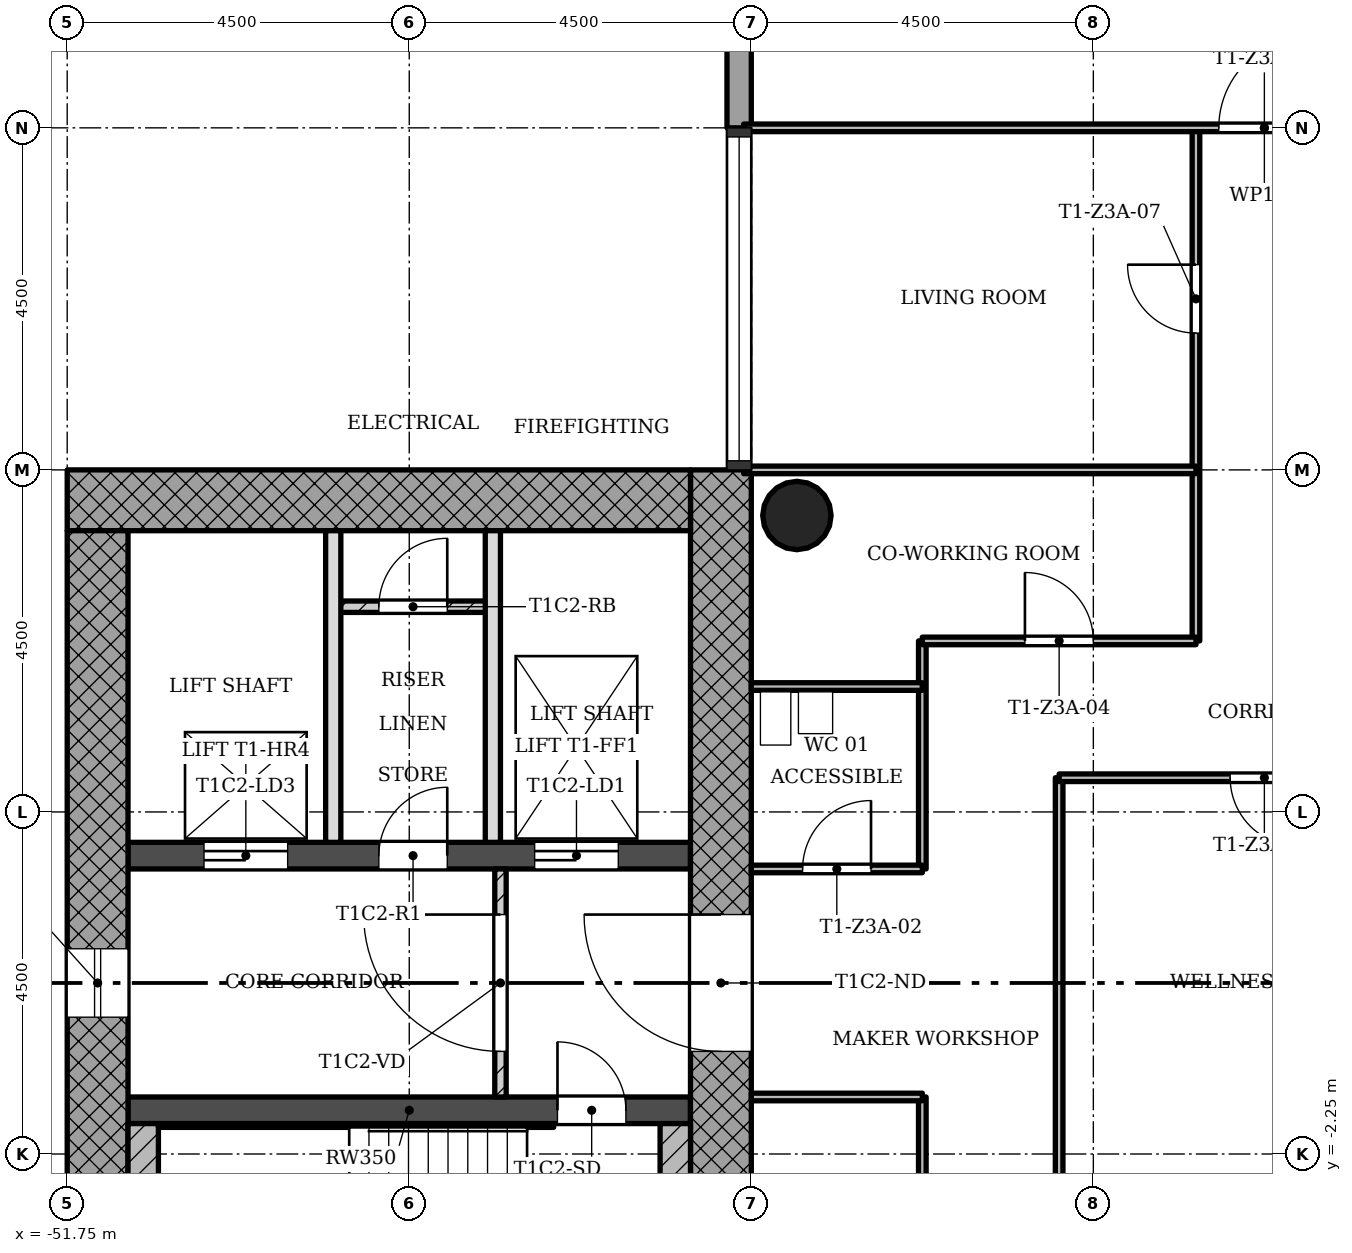
"""IFC4 building model, lengths in metres.
Left out: names, types, materials, properties, quantities, classifications, styles, units other than length and angle.
Written with IfcOpenShell. Run it as: python <this file> out.ifc"""

import sys

from ifc_helpers import new_model, si_unit, direction, frame, frame_2d, origin, origin_2d, place, context, subcontext, project, spatial, rectangle, hollow_circle, extrude, element, fill, save


model = new_model("IFC4")
c1 = context("Model", 3, precision=1e-05, world=origin(), true_north=direction((0.0, 1.0)))
c2 = subcontext(c1, "Body", "Model", "MODEL_VIEW")
j1 = project(units=[si_unit("LENGTHUNIT", "METRE"), si_unit("PLANEANGLEUNIT", "RADIAN")], contexts=[c1])
p1 = place(None, origin())
s1 = spatial("IfcSite", under=j1, at=p1, CompositionType="ELEMENT")
p2 = place(p1, origin())
s2 = spatial("IfcBuilding", under=s1, at=p2, CompositionType="ELEMENT")
p3 = place(p2, frame((0.0, 0.0, 140.5)))
s3 = spatial("IfcBuildingStorey", under=s2, at=p3, CompositionType="ELEMENT", Elevation=140.5)
p4 = place(p3, frame((-43.15, -5.95, 0.0), z_axis=(0.0, 0.0, 1.0), x_axis=(0.0, 1.0, 0.0)))
e1 = element("IfcWall", 1, at=p4, inside=s3, PredefinedType="SHEAR", context=c2, shape_type="SweptSolid", body=[
    extrude(rectangle(XDim=12.7, YDim=0.8, at=frame_2d((6.35, 0.0))), origin(), (0.0, 0.0, 1.0), 3.4),
])
p5 = place(p4, frame((5.05, 0.0, 0.0)))
e2 = element("IfcOpeningElement", 2, at=p5, cuts=e1, PredefinedType="OPENING", context=c2, shape_type="SweptSolid", body=[
    extrude(rectangle(XDim=1.8, YDim=2.1, at=frame_2d((0.9, 1.05))), frame((0.0, 0.41, 0.0), z_axis=(0.0, -1.0, 0.0), x_axis=(1.0, 0.0, 0.0)), (0.0, 0.0, 1.0), 0.82),
])
p6 = place(p3, frame((-43.55, 6.35, 0.0), z_axis=(0.0, 0.0, 1.0), x_axis=(-1.0, 0.0, 0.0)))
e3 = element("IfcWall", 3, at=p6, inside=s3, PredefinedType="SHEAR", context=c2, shape_type="SweptSolid", body=[
    extrude(rectangle(XDim=8.2, YDim=0.8, at=frame_2d((4.1, 0.0))), origin(), (0.0, 0.0, 1.0), 3.4),
])
p7 = place(p3, frame((-51.35, 5.95, 0.0), z_axis=(0.0, 0.0, 1.0), x_axis=(0.0, -1.0, 0.0)))
e4 = element("IfcWall", 4, at=p7, inside=s3, PredefinedType="SHEAR", context=c2, shape_type="SweptSolid", body=[
    extrude(rectangle(XDim=12.7, YDim=0.8, at=frame_2d((6.35, 0.0))), origin(), (0.0, 0.0, 1.0), 3.4),
])
p8 = place(p7, frame((5.5, 0.0, 0.45)))
e5 = element("IfcOpeningElement", 5, at=p8, cuts=e4, PredefinedType="OPENING", context=c2, shape_type="SweptSolid", body=[
    extrude(rectangle(XDim=0.9, YDim=2.4, at=frame_2d((0.45, 1.2))), frame((0.0, 0.41, 0.0), z_axis=(0.0, -1.0, 0.0), x_axis=(1.0, 0.0, 0.0)), (0.0, 0.0, 1.0), 0.82),
])
p9 = place(p3, frame((-50.95, -1.675, 0.0), z_axis=(0.0, 0.0, 1.0), x_axis=(1.0, 0.0, 0.0)))
e6 = element("IfcWall", 6, at=p9, inside=s3, PredefinedType="SHEAR", context=c2, shape_type="SweptSolid", body=[
    extrude(rectangle(XDim=7.4, YDim=0.35, at=frame_2d((3.7, 0.0))), origin(), (0.0, 0.0, 1.0), 3.4),
])
p10 = place(p9, frame((5.65, 0.0, 0.0)))
e7 = element("IfcOpeningElement", 7, at=p10, cuts=e6, PredefinedType="OPENING", context=c2, shape_type="SweptSolid", body=[
    extrude(rectangle(XDim=0.9, YDim=2.1, at=frame_2d((0.45, 1.05))), frame((0.0, 0.185, 0.0), z_axis=(0.0, -1.0, 0.0), x_axis=(1.0, 0.0, 0.0)), (0.0, 0.0, 1.0), 0.37),
])
p11 = place(p3, frame((-50.95, 1.675, 0.0), z_axis=(0.0, 0.0, 1.0), x_axis=(1.0, 0.0, 0.0)))
e8 = element("IfcWall", 8, at=p11, inside=s3, PredefinedType="SHEAR", context=c2, shape_type="SweptSolid", body=[
    extrude(rectangle(XDim=7.4, YDim=0.35, at=frame_2d((3.7, 0.0))), origin(), (0.0, 0.0, 1.0), 3.4),
])
p12 = place(p11, frame((5.35, 0.0, 0.0)))
e9 = element("IfcOpeningElement", 9, at=p12, cuts=e8, PredefinedType="OPENING", context=c2, shape_type="SweptSolid", body=[
    extrude(rectangle(XDim=1.1, YDim=2.1, at=frame_2d((0.55, 1.05))), frame((0.0, 0.185, 0.0), z_axis=(0.0, -1.0, 0.0), x_axis=(1.0, 0.0, 0.0)), (0.0, 0.0, 1.0), 0.37),
])
p13 = place(p11, frame((1.0, 0.0, 0.0)))
e10 = element("IfcOpeningElement", 10, at=p13, cuts=e8, PredefinedType="OPENING", context=c2, shape_type="SweptSolid", body=[
    extrude(rectangle(XDim=1.1, YDim=2.1, at=frame_2d((0.55, 1.05))), frame((0.0, 0.185, 0.0), z_axis=(0.0, -1.0, 0.0), x_axis=(1.0, 0.0, 0.0)), (0.0, 0.0, 1.0), 0.37),
])
p14 = place(p11, frame((3.3, 0.0, 0.0)))
e11 = element("IfcOpeningElement", 11, at=p14, cuts=e8, PredefinedType="OPENING", context=c2, shape_type="SweptSolid", body=[
    extrude(rectangle(XDim=0.9, YDim=2.1, at=frame_2d((0.45, 1.05))), frame((0.0, 0.185, 0.0), z_axis=(0.0, -1.0, 0.0), x_axis=(1.0, 0.0, 0.0)), (0.0, 0.0, 1.0), 0.37),
])
p15 = place(p3, frame((-42.15, 6.15, 0.0), z_axis=(0.0, 0.0, 1.0), x_axis=(1.0, 0.0, 0.0)))
e12 = element("IfcColumn", 12, at=p15, inside=s3, PredefinedType="COLUMN", context=c2, shape_type="SweptSolid", body=[
    extrude(hollow_circle(Radius=0.45, WallThickness=0.032, at=origin_2d()), origin(), (0.0, 0.0, 1.0), 3.4),
])
p16 = place(p3, frame((-42.91, 12.75, -0.3), z_axis=(0.0, 0.0, 1.0), x_axis=(0.0, -1.0, 0.0)))
e13 = element("IfcWall", 13, at=p16, inside=s3, PredefinedType="STANDARD", context=c2, shape_type="SweptSolid", body=[
    extrude(rectangle(XDim=1.5, YDim=0.32, at=frame_2d((0.75, 0.0))), origin(), (0.0, 0.0, 1.0), 3.4),
])
p17 = place(p3, frame((-46.05, 1.5, 0.0), z_axis=(0.0, 0.0, 1.0), x_axis=(0.0, -1.0, 0.0)))
e14 = element("IfcWall", 14, at=p17, inside=s3, PredefinedType="PARTITIONING", context=c2, shape_type="SweptSolid", body=[
    extrude(rectangle(XDim=3.0, YDim=0.15, at=frame_2d((1.5, 0.0))), origin(), (0.0, 0.0, 1.0), 3.0),
])
p18 = place(p17, frame((0.6, 0.0, 0.0)))
e15 = element("IfcOpeningElement", 15, at=p18, cuts=e14, PredefinedType="OPENING", context=c2, shape_type="SweptSolid", body=[
    extrude(rectangle(XDim=1.8, YDim=2.1, at=frame_2d((0.9, 1.05))), frame((0.0, 0.085, 0.0), z_axis=(0.0, -1.0, 0.0), x_axis=(1.0, 0.0, 0.0)), (0.0, 0.0, 1.0), 0.17),
])
for number, where, z_axis, x_axis in (
    (16, (-48.25, 5.95, 0.0), (0.0, 0.0, 1.0), (0.0, -1.0, 0.0)),
    (17, (-46.15, 5.95, 0.0), (0.0, 0.0, 1.0), (0.0, -1.0, 0.0)),
):
    element("IfcWall", number, at=place(p3, frame(where, z_axis=z_axis, x_axis=x_axis)), inside=s3, PredefinedType="SOLIDWALL", context=c2, shape_type="SweptSolid", body=[
        extrude(rectangle(XDim=4.1, YDim=0.2, at=frame_2d((2.05, 0.0))), origin(), (0.0, 0.0, 1.0), 3.0),
    ])
p19 = place(p3, frame((-46.15, 4.95, 0.0), z_axis=(0.0, 0.0, 1.0), x_axis=(-1.0, 0.0, 0.0)))
e18 = element("IfcWall", 18, at=p19, inside=s3, PredefinedType="PARTITIONING", context=c2, shape_type="SweptSolid", body=[
    extrude(rectangle(XDim=2.1, YDim=0.15, at=frame_2d((1.05, 0.0))), origin(), (0.0, 0.0, 1.0), 3.0),
])
p20 = place(p19, frame((0.6, 0.0, 0.0)))
e19 = element("IfcOpeningElement", 19, at=p20, cuts=e18, PredefinedType="OPENING", context=c2, shape_type="SweptSolid", body=[
    extrude(rectangle(XDim=0.9, YDim=2.1, at=frame_2d((0.45, 1.05))), frame((0.0, 0.085, 0.0), z_axis=(0.0, -1.0, 0.0), x_axis=(1.0, 0.0, 0.0)), (0.0, 0.0, 1.0), 0.17),
])
for number, where, z_axis, x_axis in (
    (20, (-40.5, -4.5, 0.0), (0.0, 0.0, 1.0), (0.0, 1.0, 0.0)),
    (21, (-40.5, 1.5, 0.0), (0.0, 0.0, 1.0), (0.0, 1.0, 0.0)),
):
    element("IfcWall", number, at=place(p3, frame(where, z_axis=z_axis, x_axis=x_axis)), inside=s3, PredefinedType="PARTITIONING", context=c2, shape_type="SweptSolid", body=[
        extrude(rectangle(XDim=3.0, YDim=0.1, at=frame_2d((1.5, 0.0))), origin(), (0.0, 0.0, 1.0), 3.0),
    ])
p21 = place(p3, frame((-38.7, -2.7, 0.0), z_axis=(0.0, 0.0, 1.0), x_axis=(0.0, 1.0, 0.0)))
e22 = element("IfcWall", 22, at=p21, inside=s3, PredefinedType="PARTITIONING", context=c2, shape_type="SweptSolid", body=[
    extrude(rectangle(XDim=5.4, YDim=0.1, at=frame_2d((2.7, 0.0))), origin(), (0.0, 0.0, 1.0), 3.0),
])
p22 = place(p3, frame((-36.9, 4.5, 0.0), z_axis=(0.0, 0.0, 1.0), x_axis=(0.0, 1.0, 0.0)))
e23 = element("IfcWall", 23, at=p22, inside=s3, PredefinedType="PARTITIONING", context=c2, shape_type="SweptSolid", body=[
    extrude(rectangle(XDim=6.75, YDim=0.1, at=frame_2d((3.375, 0.0))), origin(), (0.0, 0.0, 1.0), 3.0),
])
p23 = place(p22, frame((4.05, 0.0, 0.0)))
e24 = element("IfcOpeningElement", 24, at=p23, cuts=e23, PredefinedType="OPENING", context=c2, shape_type="SweptSolid", body=[
    extrude(rectangle(XDim=0.9, YDim=2.1, at=frame_2d((0.45, 1.05))), frame((0.0, 0.06, 0.0), z_axis=(0.0, -1.0, 0.0), x_axis=(1.0, 0.0, 0.0)), (0.0, 0.0, 1.0), 0.12),
])
p24 = place(p3, frame((-42.75, -1.5, 0.0), z_axis=(0.0, 0.0, 1.0), x_axis=(1.0, 0.0, 0.0)))
e25 = element("IfcWall", 25, at=p24, inside=s3, PredefinedType="PARTITIONING", context=c2, shape_type="SweptSolid", body=[
    extrude(rectangle(XDim=2.25, YDim=0.1, at=frame_2d((1.125, 0.0))), origin(), (0.0, 0.0, 1.0), 3.0),
])
p25 = place(p3, frame((-42.75, 1.5, 0.0), z_axis=(0.0, 0.0, 1.0), x_axis=(1.0, 0.0, 0.0)))
e26 = element("IfcWall", 26, at=p25, inside=s3, PredefinedType="PARTITIONING", context=c2, shape_type="SweptSolid", body=[
    extrude(rectangle(XDim=2.25, YDim=0.1, at=frame_2d((1.125, 0.0))), origin(), (0.0, 0.0, 1.0), 3.0),
])
p26 = place(p25, frame((0.675, 0.0, 0.0)))
e27 = element("IfcOpeningElement", 27, at=p26, cuts=e26, PredefinedType="OPENING", context=c2, shape_type="SweptSolid", body=[
    extrude(rectangle(XDim=0.9, YDim=2.1, at=frame_2d((0.45, 1.05))), frame((0.0, 0.06, 0.0), z_axis=(0.0, -1.0, 0.0), x_axis=(1.0, 0.0, 0.0)), (0.0, 0.0, 1.0), 0.12),
])
p27 = place(p3, frame((-38.7, 2.7, 0.0), z_axis=(0.0, 0.0, 1.0), x_axis=(1.0, 0.0, 0.0)))
e28 = element("IfcWall", 28, at=p27, inside=s3, PredefinedType="PARTITIONING", context=c2, shape_type="SweptSolid", body=[
    extrude(rectangle(XDim=5.4, YDim=0.1, at=frame_2d((2.7, 0.0))), origin(), (0.0, 0.0, 1.0), 3.0),
])
p28 = place(p27, frame((2.25, 0.0, 0.0)))
e29 = element("IfcOpeningElement", 29, at=p28, cuts=e28, PredefinedType="OPENING", context=c2, shape_type="SweptSolid", body=[
    extrude(rectangle(XDim=0.9, YDim=2.1, at=frame_2d((0.45, 1.05))), frame((0.0, 0.06, 0.0), z_axis=(0.0, -1.0, 0.0), x_axis=(1.0, 0.0, 0.0)), (0.0, 0.0, 1.0), 0.12),
])
p29 = place(p3, frame((-42.75, 3.9, 0.0), z_axis=(0.0, 0.0, 1.0), x_axis=(1.0, 0.0, 0.0)))
e30 = element("IfcWall", 30, at=p29, inside=s3, PredefinedType="PARTITIONING", context=c2, shape_type="SweptSolid", body=[
    extrude(rectangle(XDim=2.25, YDim=0.1, at=frame_2d((1.125, 0.0))), origin(), (0.0, 0.0, 1.0), 3.0),
])
p30 = place(p3, frame((-40.5, 4.5, 0.0), z_axis=(0.0, 0.0, 1.0), x_axis=(1.0, 0.0, 0.0)))
e31 = element("IfcWall", 31, at=p30, inside=s3, PredefinedType="PARTITIONING", context=c2, shape_type="SweptSolid", body=[
    extrude(rectangle(XDim=3.6, YDim=0.1, at=frame_2d((1.8, 0.0))), origin(), (0.0, 0.0, 1.0), 3.0),
])
p31 = place(p30, frame((1.35, 0.0, 0.0)))
e32 = element("IfcOpeningElement", 32, at=p31, cuts=e31, PredefinedType="OPENING", context=c2, shape_type="SweptSolid", body=[
    extrude(rectangle(XDim=0.9, YDim=2.1, at=frame_2d((0.45, 1.05))), frame((0.0, 0.06, 0.0), z_axis=(0.0, -1.0, 0.0), x_axis=(1.0, 0.0, 0.0)), (0.0, 0.0, 1.0), 0.12),
])
p32 = place(p3, frame((-42.85, 6.75, 0.0), z_axis=(0.0, 0.0, 1.0), x_axis=(1.0, 0.0, 0.0)))
e33 = element("IfcWall", 33, at=p32, inside=s3, PredefinedType="PARTITIONING", context=c2, shape_type="SweptSolid", body=[
    extrude(rectangle(XDim=5.95, YDim=0.1, at=frame_2d((2.975, 0.0))), origin(), (0.0, 0.0, 1.0), 3.0),
])
p33 = place(p3, frame((-42.85, 11.25, 0.0), z_axis=(0.0, 0.0, 1.0), x_axis=(1.0, 0.0, 0.0)))
e34 = element("IfcWall", 34, at=p33, inside=s3, PredefinedType="PARTITIONING", context=c2, shape_type="SweptSolid", body=[
    extrude(rectangle(XDim=13.7, YDim=0.1, at=frame_2d((6.85, 0.0))), origin(), (0.0, 0.0, 1.0), 3.0),
])
p34 = place(p33, frame((6.25, 0.0, 0.0)))
e35 = element("IfcOpeningElement", 35, at=p34, cuts=e34, PredefinedType="OPENING", context=c2, shape_type="SweptSolid", body=[
    extrude(rectangle(XDim=1.2, YDim=2.1, at=frame_2d((0.6, 1.05))), frame((0.0, 0.06, 0.0), z_axis=(0.0, -1.0, 0.0), x_axis=(1.0, 0.0, 0.0)), (0.0, 0.0, 1.0), 0.12),
])
for number, where, z_axis, x_axis in (
    (36, (-50.75, -1.85, 0.0), (0.0, 0.0, 1.0), (0.0, -1.0, 0.0)),
    (37, (-43.75, -1.85, 0.0), (0.0, 0.0, 1.0), (0.0, -1.0, 0.0)),
):
    element("IfcWall", number, at=place(p3, frame(where, z_axis=z_axis, x_axis=x_axis)), inside=s3, PredefinedType="SHEAR", context=c2, shape_type="SweptSolid", body=[
        extrude(rectangle(XDim=4.1, YDim=0.4, at=frame_2d((2.05, 0.0))), origin(), (0.0, 0.0, 1.0), 3.4),
    ])
p35 = place(p3, frame((-45.35, -1.875, 0.0), z_axis=(0.0, 0.0, 1.0), x_axis=(-1.0, 0.0, 0.0)))
e38 = element("IfcWall", 38, at=p35, inside=s3, PredefinedType="SHEAR", context=c2, shape_type="SweptSolid", body=[
    extrude(rectangle(XDim=5.2, YDim=0.05, at=frame_2d((2.6, 0.0))), origin(), (0.0, 0.0, 1.0), 3.4),
])
p36 = place(p8, origin())
e39 = element("IfcWindow", 39, at=p36, inside=s3, PartitioningType="SINGLE_PANEL", PredefinedType="WINDOW", context=c2, shape_type="SweptSolid", body=[
    extrude(rectangle(XDim=0.9, YDim=2.4, at=frame_2d((0.45, 1.2))), frame((0.0, 0.03, 0.0), z_axis=(0.0, -1.0, 0.0), x_axis=(1.0, 0.0, 0.0)), (0.0, 0.0, 1.0), 0.06),
])
fill(e5, e39)
p37 = place(p18, origin())
e40 = element("IfcDoor", 40, at=p37, inside=s3, OperationType="SINGLE_SWING_LEFT", PredefinedType="DOOR", context=c2, shape_type="SweptSolid", body=[
    extrude(rectangle(XDim=1.8, YDim=2.1, at=frame_2d((0.9, 1.05))), frame((0.0, 0.025, 0.0), z_axis=(0.0, -1.0, 0.0), x_axis=(1.0, 0.0, 0.0)), (0.0, 0.0, 1.0), 0.05),
])
fill(e15, e40)
p38 = place(p20, origin())
e41 = element("IfcDoor", 41, at=p38, inside=s3, OperationType="SINGLE_SWING_LEFT", PredefinedType="DOOR", context=c2, shape_type="SweptSolid", body=[
    extrude(rectangle(XDim=0.9, YDim=2.1, at=frame_2d((0.45, 1.05))), frame((0.0, 0.025, 0.0), z_axis=(0.0, -1.0, 0.0), x_axis=(1.0, 0.0, 0.0)), (0.0, 0.0, 1.0), 0.05),
])
fill(e19, e41)
p39 = place(p28, origin())
e42 = element("IfcDoor", 42, at=p39, inside=s3, OperationType="SINGLE_SWING_RIGHT", PredefinedType="DOOR", context=c2, shape_type="SweptSolid", body=[
    extrude(rectangle(XDim=0.9, YDim=2.1, at=frame_2d((0.45, 1.05))), frame((0.0, 0.025, 0.0), z_axis=(0.0, -1.0, 0.0), x_axis=(1.0, 0.0, 0.0)), (0.0, 0.0, 1.0), 0.05),
])
fill(e29, e42)
p40 = place(p26, origin())
e43 = element("IfcDoor", 43, at=p40, inside=s3, OperationType="SINGLE_SWING_LEFT", PredefinedType="DOOR", context=c2, shape_type="SweptSolid", body=[
    extrude(rectangle(XDim=0.9, YDim=2.1, at=frame_2d((0.45, 1.05))), frame((0.0, 0.025, 0.0), z_axis=(0.0, -1.0, 0.0), x_axis=(1.0, 0.0, 0.0)), (0.0, 0.0, 1.0), 0.05),
])
fill(e27, e43)
p41 = place(p31, origin())
e44 = element("IfcDoor", 44, at=p41, inside=s3, OperationType="SINGLE_SWING_RIGHT", PredefinedType="DOOR", context=c2, shape_type="SweptSolid", body=[
    extrude(rectangle(XDim=0.9, YDim=2.1, at=frame_2d((0.45, 1.05))), frame((0.0, 0.025, 0.0), z_axis=(0.0, -1.0, 0.0), x_axis=(1.0, 0.0, 0.0)), (0.0, 0.0, 1.0), 0.05),
])
fill(e32, e44)
p42 = place(p23, origin())
e45 = element("IfcDoor", 45, at=p42, inside=s3, OperationType="SINGLE_SWING_LEFT", PredefinedType="DOOR", context=c2, shape_type="SweptSolid", body=[
    extrude(rectangle(XDim=0.9, YDim=2.1, at=frame_2d((0.45, 1.05))), frame((0.0, 0.025, 0.0), z_axis=(0.0, -1.0, 0.0), x_axis=(1.0, 0.0, 0.0)), (0.0, 0.0, 1.0), 0.05),
])
fill(e24, e45)
p43 = place(p34, origin())
e46 = element("IfcDoor", 46, at=p43, inside=s3, OperationType="SINGLE_SWING_LEFT", PredefinedType="DOOR", context=c2, shape_type="SweptSolid", body=[
    extrude(rectangle(XDim=1.2, YDim=2.1, at=frame_2d((0.6, 1.05))), frame((0.0, 0.025, 0.0), z_axis=(0.0, -1.0, 0.0), x_axis=(1.0, 0.0, 0.0)), (0.0, 0.0, 1.0), 0.05),
])
fill(e35, e46)
p44 = place(p10, origin())
e47 = element("IfcDoor", 47, at=p44, inside=s3, OperationType="SINGLE_SWING_RIGHT", PredefinedType="DOOR", context=c2, shape_type="SweptSolid", body=[
    extrude(rectangle(XDim=0.9, YDim=2.1, at=frame_2d((0.45, 1.05))), frame((0.0, 0.025, 0.0), z_axis=(0.0, -1.0, 0.0), x_axis=(1.0, 0.0, 0.0)), (0.0, 0.0, 1.0), 0.05),
])
fill(e7, e47)
p45 = place(p12, origin())
e48 = element("IfcDoor", 48, at=p45, inside=s3, OperationType="SLIDING_TO_LEFT", PredefinedType="DOOR", context=c2, shape_type="SweptSolid", body=[
    extrude(rectangle(XDim=1.1, YDim=2.1, at=frame_2d((0.55, 1.05))), frame((0.0, 0.025, 0.0), z_axis=(0.0, -1.0, 0.0), x_axis=(1.0, 0.0, 0.0)), (0.0, 0.0, 1.0), 0.05),
])
fill(e9, e48)
p46 = place(p13, origin())
e49 = element("IfcDoor", 49, at=p46, inside=s3, OperationType="SLIDING_TO_LEFT", PredefinedType="DOOR", context=c2, shape_type="SweptSolid", body=[
    extrude(rectangle(XDim=1.1, YDim=2.1, at=frame_2d((0.55, 1.05))), frame((0.0, 0.025, 0.0), z_axis=(0.0, -1.0, 0.0), x_axis=(1.0, 0.0, 0.0)), (0.0, 0.0, 1.0), 0.05),
])
fill(e10, e49)
p47 = place(p14, origin())
e50 = element("IfcDoor", 50, at=p47, inside=s3, OperationType="SINGLE_SWING_LEFT", PredefinedType="DOOR", context=c2, shape_type="SweptSolid", body=[
    extrude(rectangle(XDim=0.9, YDim=2.1, at=frame_2d((0.45, 1.05))), frame((0.0, 0.025, 0.0), z_axis=(0.0, -1.0, 0.0), x_axis=(1.0, 0.0, 0.0)), (0.0, 0.0, 1.0), 0.05),
])
fill(e11, e50)
p48 = place(p5, origin())
e51 = element("IfcDoor", 51, at=p48, inside=s3, OperationType="SINGLE_SWING_LEFT", PredefinedType="DOOR", context=c2, shape_type="SweptSolid", body=[
    extrude(rectangle(XDim=1.8, YDim=2.1, at=frame_2d((0.9, 1.05))), frame((0.0, 0.025, 0.0), z_axis=(0.0, -1.0, 0.0), x_axis=(1.0, 0.0, 0.0)), (0.0, 0.0, 1.0), 0.05),
])
fill(e2, e51)
save(model, sys.argv[1])
